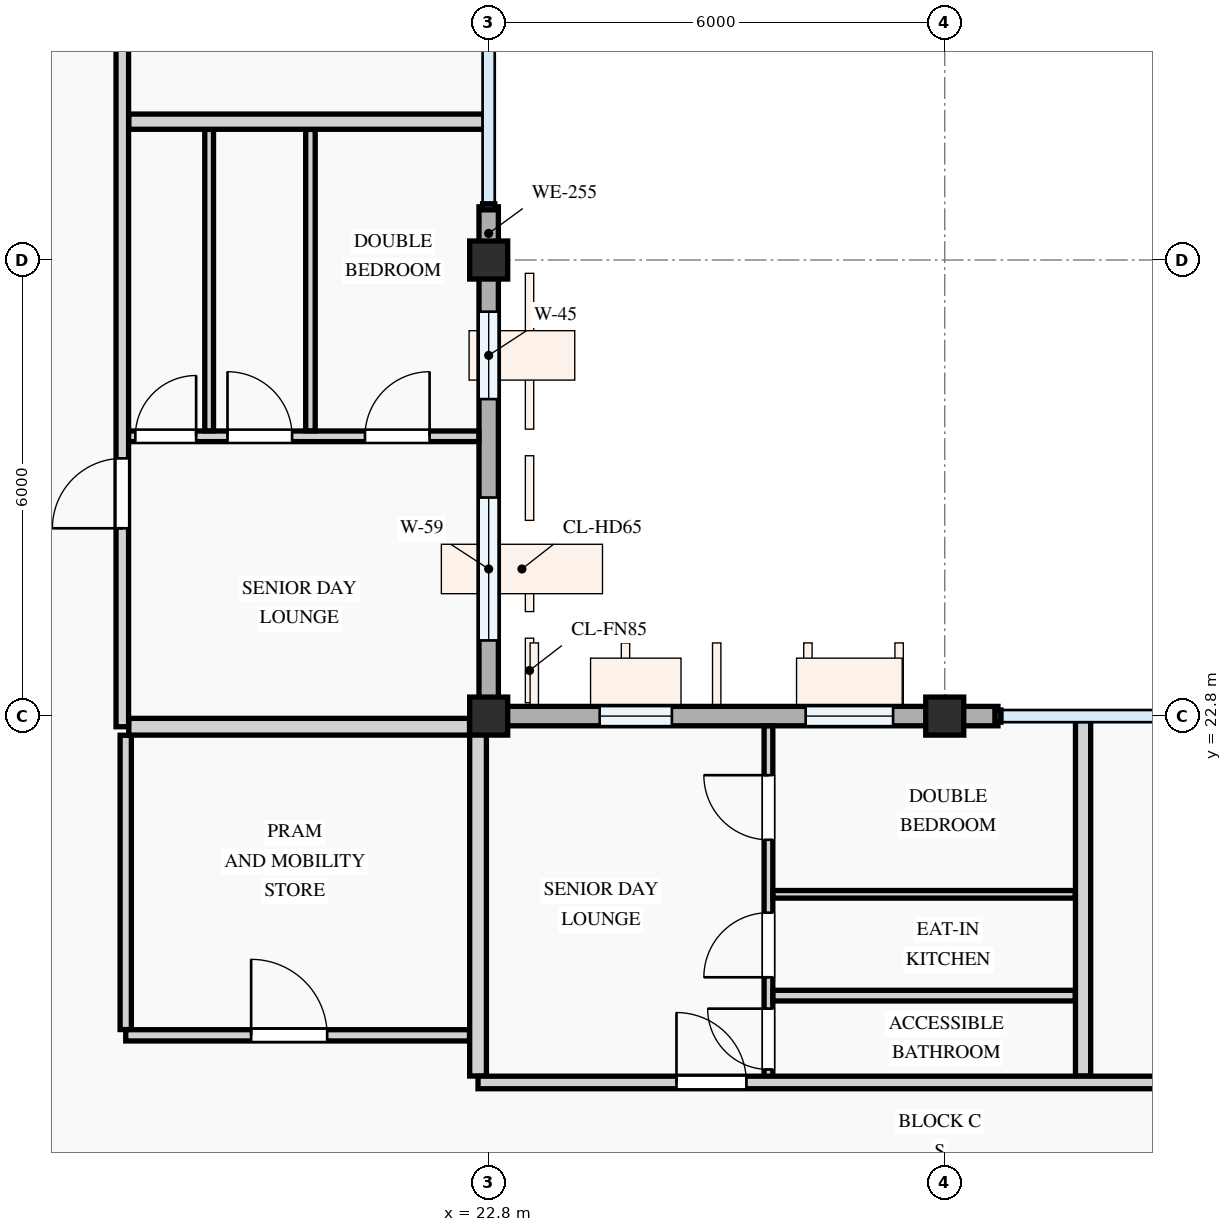
"""IFC4 building model, lengths in metres.
Left out: names, types, materials, properties, quantities, classifications, styles, units other than length and angle.
Written with IfcOpenShell. Run it as: python <this file> out.ifc"""

import sys

from ifc_helpers import new_model, si_unit, direction, frame, frame_2d, origin, origin_2d, place, context, subcontext, project, spatial, rectangle, extrude, element, fill, save


model = new_model("IFC4")
c1 = context("Model", 3, precision=1e-05, world=origin(), true_north=direction((0.0, 1.0)))
c2 = subcontext(c1, "Body", "Model", "MODEL_VIEW")
j1 = project(units=[si_unit("LENGTHUNIT", "METRE"), si_unit("PLANEANGLEUNIT", "RADIAN")], contexts=[c1])
p1 = place(None, origin())
s1 = spatial("IfcSite", under=j1, at=p1, CompositionType="ELEMENT")
p2 = place(p1, origin())
s2 = spatial("IfcBuilding", under=s1, at=p2, CompositionType="ELEMENT")
p3 = place(p2, frame((0.0, 0.0, 31.2)))
s3 = spatial("IfcBuildingStorey", under=s2, at=p3, CompositionType="ELEMENT", Elevation=31.2)
for number, where, z_axis, x_axis in (
    (1, (22.8, 22.8, 0.0), (0.0, 0.0, 1.0), (1.0, 0.0, 0.0)),
    (2, (22.8, 28.8, 0.0), (0.0, 0.0, 1.0), (1.0, 0.0, 0.0)),
    (3, (28.8, 22.8, 0.0), (0.0, 0.0, 1.0), (1.0, 0.0, 0.0)),
):
    element("IfcColumn", number, at=place(p3, frame(where, z_axis=z_axis, x_axis=x_axis)), inside=s3, PredefinedType="COLUMN", context=c2, shape_type="SweptSolid", body=[
        extrude(rectangle(XDim=0.5, YDim=0.5, at=origin_2d()), origin(), (0.0, 0.0, 1.0), 3.3),
    ])
p4 = place(p3, frame((22.8, 22.8, 0.0), z_axis=(0.0, 0.0, 1.0), x_axis=(0.0, 1.0, 0.0)))
e4 = element("IfcWall", 4, at=p4, inside=s3, PredefinedType="STANDARD", context=c2, shape_type="SweptSolid", body=[
    extrude(rectangle(XDim=6.0, YDim=0.255, at=frame_2d((3.0, 0.0))), origin(), (0.0, 0.0, 1.0), 2.575),
])
p5 = place(p4, frame((0.995, 0.0, 0.78)))
e5 = element("IfcOpeningElement", 5, at=p5, cuts=e4, PredefinedType="OPENING", context=c2, shape_type="SweptSolid", body=[
    extrude(rectangle(XDim=1.88, YDim=1.52, at=frame_2d((0.94, 0.76))), frame((0.0, 0.137, 0.0), z_axis=(0.0, -1.0, 0.0), x_axis=(1.0, 0.0, 0.0)), (0.0, 0.0, 1.0), 0.275),
])
p6 = place(p4, frame((4.17, 0.0, 0.78)))
e6 = element("IfcOpeningElement", 6, at=p6, cuts=e4, PredefinedType="OPENING", context=c2, shape_type="SweptSolid", body=[
    extrude(rectangle(XDim=1.15, YDim=1.25, at=frame_2d((0.575, 0.625))), frame((0.0, 0.137, 0.0), z_axis=(0.0, -1.0, 0.0), x_axis=(1.0, 0.0, 0.0)), (0.0, 0.0, 1.0), 0.275),
])
p7 = place(p3, frame((22.8, 28.8, 0.0), z_axis=(0.0, 0.0, 1.0), x_axis=(0.0, 1.0, 0.0)))
e7 = element("IfcWall", 7, at=p7, inside=s3, PredefinedType="STANDARD", context=c2, shape_type="SweptSolid", body=[
    extrude(rectangle(XDim=0.7, YDim=0.255, at=frame_2d((0.35, 0.0))), origin(), (0.0, 0.0, 1.0), 2.425),
])
p8 = place(p3, frame((29.5, 22.8, 0.0), z_axis=(0.0, 0.0, 1.0), x_axis=(-1.0, 0.0, 0.0)))
e8 = element("IfcWall", 8, at=p8, inside=s3, PredefinedType="STANDARD", context=c2, shape_type="SweptSolid", body=[
    extrude(rectangle(XDim=0.7, YDim=0.255, at=frame_2d((0.35, 0.0))), origin(), (0.0, 0.0, 1.0), 2.375),
])
p9 = place(p3, frame((28.8, 22.8, 0.0), z_axis=(0.0, 0.0, 1.0), x_axis=(-1.0, 0.0, 0.0)))
e9 = element("IfcWall", 9, at=p9, inside=s3, PredefinedType="STANDARD", context=c2, shape_type="SweptSolid", body=[
    extrude(rectangle(XDim=6.0, YDim=0.255, at=frame_2d((3.0, 0.0))), origin(), (0.0, 0.0, 1.0), 2.525),
])
p10 = place(p9, frame((0.68, 0.0, 0.78)))
e10 = element("IfcOpeningElement", 10, at=p10, cuts=e9, PredefinedType="OPENING", context=c2, shape_type="SweptSolid", body=[
    extrude(rectangle(XDim=1.15, YDim=1.25, at=frame_2d((0.575, 0.625))), frame((0.0, 0.137, 0.0), z_axis=(0.0, -1.0, 0.0), x_axis=(1.0, 0.0, 0.0)), (0.0, 0.0, 1.0), 0.275),
])
p11 = place(p9, frame((3.59, 0.0, 0.78)))
e11 = element("IfcOpeningElement", 11, at=p11, cuts=e9, PredefinedType="OPENING", context=c2, shape_type="SweptSolid", body=[
    extrude(rectangle(XDim=0.95, YDim=1.15, at=frame_2d((0.475, 0.575))), frame((0.0, 0.137, 0.0), z_axis=(0.0, -1.0, 0.0), x_axis=(1.0, 0.0, 0.0)), (0.0, 0.0, 1.0), 0.275),
])
p12 = place(p3, frame((18.025, 18.676, 0.0), z_axis=(0.0, 0.0, 1.0), x_axis=(0.0, 1.0, 0.0)))
e12 = element("IfcWall", 12, at=p12, inside=s3, PredefinedType="PARTITIONING", context=c2, shape_type="SweptSolid", body=[
    extrude(rectangle(XDim=3.872, YDim=0.148, at=frame_2d((1.936, 0.0))), origin(), (0.0, 0.0, 1.0), 3.0),
])
p13 = place(p3, frame((18.025, 18.6, 0.0), z_axis=(0.0, 0.0, 1.0), x_axis=(1.0, 0.0, 0.0)))
e13 = element("IfcWall", 13, at=p13, inside=s3, PredefinedType="PARTITIONING", context=c2, shape_type="SweptSolid", body=[
    extrude(rectangle(XDim=4.523, YDim=0.148, at=frame_2d((2.262, 0.0))), origin(), (0.0, 0.0, 1.0), 3.0),
])
p14 = place(p13, frame((1.65, 0.0, 0.0)))
e14 = element("IfcOpeningElement", 14, at=p14, cuts=e13, PredefinedType="OPENING", context=c2, shape_type="SweptSolid", body=[
    extrude(rectangle(XDim=1.0, YDim=2.15, at=frame_2d((0.5, 1.075))), frame((0.0, 0.084, 0.0), z_axis=(0.0, -1.0, 0.0), x_axis=(1.0, 0.0, 0.0)), (0.0, 0.0, 1.0), 0.168),
])
p15 = place(p3, frame((17.98, 26.481, 0.0), z_axis=(0.0, 0.0, 1.0), x_axis=(1.0, 0.0, 0.0)))
e15 = element("IfcWall", 15, at=p15, inside=s3, PredefinedType="PARTITIONING", context=c2, shape_type="SweptSolid", body=[
    extrude(rectangle(XDim=4.69, YDim=0.14, at=frame_2d((2.345, 0.0))), origin(), (0.0, 0.0, 1.0), 3.0),
])
p16 = place(p15, frame((0.171, 0.0, 0.0)))
e16 = element("IfcOpeningElement", 16, at=p16, cuts=e15, PredefinedType="OPENING", context=c2, shape_type="SweptSolid", body=[
    extrude(rectangle(XDim=0.8, YDim=2.1, at=frame_2d((0.4, 1.05))), frame((0.0, 0.08, 0.0), z_axis=(0.0, -1.0, 0.0), x_axis=(1.0, 0.0, 0.0)), (0.0, 0.0, 1.0), 0.16),
])
p17 = place(p15, frame((1.384, 0.0, 0.0)))
e17 = element("IfcOpeningElement", 17, at=p17, cuts=e15, PredefinedType="OPENING", context=c2, shape_type="SweptSolid", body=[
    extrude(rectangle(XDim=0.85, YDim=2.1, at=frame_2d((0.425, 1.05))), frame((0.0, 0.08, 0.0), z_axis=(0.0, -1.0, 0.0), x_axis=(1.0, 0.0, 0.0)), (0.0, 0.0, 1.0), 0.16),
])
p18 = place(p15, frame((3.193, 0.0, 0.0)))
e18 = element("IfcOpeningElement", 18, at=p18, cuts=e15, PredefinedType="OPENING", context=c2, shape_type="SweptSolid", body=[
    extrude(rectangle(XDim=0.85, YDim=2.1, at=frame_2d((0.425, 1.05))), frame((0.0, 0.08, 0.0), z_axis=(0.0, -1.0, 0.0), x_axis=(1.0, 0.0, 0.0)), (0.0, 0.0, 1.0), 0.16),
])
p19 = place(p3, frame((20.455, 26.553, 0.0), z_axis=(0.0, 0.0, 1.0), x_axis=(0.0, 1.0, 0.0)))
e19 = element("IfcWall", 19, at=p19, inside=s3, PredefinedType="PARTITIONING", context=c2, shape_type="SweptSolid", body=[
    extrude(rectangle(XDim=3.965, YDim=0.125, at=frame_2d((1.983, 0.0))), origin(), (0.0, 0.0, 1.0), 3.0),
])
p20 = place(p3, frame((19.122, 26.553, 0.0), z_axis=(0.0, 0.0, 1.0), x_axis=(0.0, 1.0, 0.0)))
e20 = element("IfcWall", 20, at=p20, inside=s3, PredefinedType="PARTITIONING", context=c2, shape_type="SweptSolid", body=[
    extrude(rectangle(XDim=3.965, YDim=0.115, at=frame_2d((1.983, 0.0))), origin(), (0.0, 0.0, 1.0), 3.0),
])
p21 = place(p3, frame((18.064, 22.66, 0.0), z_axis=(0.0, 0.0, 1.0), x_axis=(1.0, 0.0, 0.0)))
e21 = element("IfcWall", 21, at=p21, inside=s3, PredefinedType="PARTITIONING", context=c2, shape_type="SweptSolid", body=[
    extrude(rectangle(XDim=4.484, YDim=0.22, at=frame_2d((2.242, 0.0))), origin(), (0.0, 0.0, 1.0), 2.375),
])
p22 = place(p3, frame((18.064, 30.62, 0.0), z_axis=(0.0, 0.0, 1.0), x_axis=(1.0, 0.0, 0.0)))
e22 = element("IfcWall", 22, at=p22, inside=s3, PredefinedType="PARTITIONING", context=c2, shape_type="SweptSolid", body=[
    extrude(rectangle(XDim=4.676, YDim=0.2, at=frame_2d((2.338, 0.0))), origin(), (0.0, 0.0, 1.0), 3.0),
])
p23 = place(p3, frame((17.98, 22.66, 0.0), z_axis=(0.0, 0.0, 1.0), x_axis=(0.0, 1.0, 0.0)))
e23 = element("IfcWall", 23, at=p23, inside=s3, PredefinedType="PARTITIONING", context=c2, shape_type="SweptSolid", body=[
    extrude(rectangle(XDim=20.411, YDim=0.165, at=frame_2d((10.205, 0.0))), origin(), (0.0, 0.0, 1.0), 3.0),
])
p24 = place(p23, frame((2.611, 0.0, 0.0)))
e24 = element("IfcOpeningElement", 24, at=p24, cuts=e23, PredefinedType="OPENING", context=c2, shape_type="SweptSolid", body=[
    extrude(rectangle(XDim=0.92, YDim=2.1, at=frame_2d((0.46, 1.05))), frame((0.0, 0.093, 0.0), z_axis=(0.0, -1.0, 0.0), x_axis=(1.0, 0.0, 0.0)), (0.0, 0.0, 1.0), 0.185),
])
p25 = place(p23, frame((9.885, 0.0, 0.0)))
e25 = element("IfcOpeningElement", 25, at=p25, cuts=e23, PredefinedType="OPENING", context=c2, shape_type="SweptSolid", body=[
    extrude(rectangle(XDim=0.92, YDim=2.1, at=frame_2d((0.46, 1.05))), frame((0.0, 0.093, 0.0), z_axis=(0.0, -1.0, 0.0), x_axis=(1.0, 0.0, 0.0)), (0.0, 0.0, 1.0), 0.185),
])
p26 = place(p3, frame((26.481, 17.98, 0.0), z_axis=(0.0, 0.0, 1.0), x_axis=(0.0, 1.0, 0.0)))
e26 = element("IfcWall", 26, at=p26, inside=s3, PredefinedType="PARTITIONING", context=c2, shape_type="SweptSolid", body=[
    extrude(rectangle(XDim=4.69, YDim=0.115, at=frame_2d((2.345, 0.0))), origin(), (0.0, 0.0, 1.0), 3.0),
])
p27 = place(p26, frame((0.171, 0.0, 0.0)))
e27 = element("IfcOpeningElement", 27, at=p27, cuts=e26, PredefinedType="OPENING", context=c2, shape_type="SweptSolid", body=[
    extrude(rectangle(XDim=0.8, YDim=2.1, at=frame_2d((0.4, 1.05))), frame((0.0, 0.067, 0.0), z_axis=(0.0, -1.0, 0.0), x_axis=(1.0, 0.0, 0.0)), (0.0, 0.0, 1.0), 0.135),
])
p28 = place(p26, frame((1.384, 0.0, 0.0)))
e28 = element("IfcOpeningElement", 28, at=p28, cuts=e26, PredefinedType="OPENING", context=c2, shape_type="SweptSolid", body=[
    extrude(rectangle(XDim=0.85, YDim=2.1, at=frame_2d((0.425, 1.05))), frame((0.0, 0.067, 0.0), z_axis=(0.0, -1.0, 0.0), x_axis=(1.0, 0.0, 0.0)), (0.0, 0.0, 1.0), 0.135),
])
p29 = place(p26, frame((3.193, 0.0, 0.0)))
e29 = element("IfcOpeningElement", 29, at=p29, cuts=e26, PredefinedType="OPENING", context=c2, shape_type="SweptSolid", body=[
    extrude(rectangle(XDim=0.85, YDim=2.1, at=frame_2d((0.425, 1.05))), frame((0.0, 0.067, 0.0), z_axis=(0.0, -1.0, 0.0), x_axis=(1.0, 0.0, 0.0)), (0.0, 0.0, 1.0), 0.135),
])
p30 = place(p3, frame((26.54, 20.455, 0.0), z_axis=(0.0, 0.0, 1.0), x_axis=(1.0, 0.0, 0.0)))
e30 = element("IfcWall", 30, at=p30, inside=s3, PredefinedType="PARTITIONING", context=c2, shape_type="SweptSolid", body=[
    extrude(rectangle(XDim=3.978, YDim=0.1, at=frame_2d((1.989, 0.0))), origin(), (0.0, 0.0, 1.0), 3.0),
])
p31 = place(p3, frame((26.54, 19.122, 0.0), z_axis=(0.0, 0.0, 1.0), x_axis=(1.0, 0.0, 0.0)))
e31 = element("IfcWall", 31, at=p31, inside=s3, PredefinedType="PARTITIONING", context=c2, shape_type="SweptSolid", body=[
    extrude(rectangle(XDim=3.978, YDim=0.14, at=frame_2d((1.989, 0.0))), origin(), (0.0, 0.0, 1.0), 3.0),
])
p32 = place(p3, frame((22.66, 18.064, 0.0), z_axis=(0.0, 0.0, 1.0), x_axis=(0.0, 1.0, 0.0)))
e32 = element("IfcWall", 32, at=p32, inside=s3, PredefinedType="PARTITIONING", context=c2, shape_type="SweptSolid", body=[
    extrude(rectangle(XDim=4.676, YDim=0.22, at=frame_2d((2.338, 0.0))), origin(), (0.0, 0.0, 1.0), 2.425),
])
p33 = place(p3, frame((30.62, 18.064, 0.0), z_axis=(0.0, 0.0, 1.0), x_axis=(0.0, 1.0, 0.0)))
e33 = element("IfcWall", 33, at=p33, inside=s3, PredefinedType="PARTITIONING", context=c2, shape_type="SweptSolid", body=[
    extrude(rectangle(XDim=4.676, YDim=0.2, at=frame_2d((2.338, 0.0))), origin(), (0.0, 0.0, 1.0), 3.0),
])
p34 = place(p3, frame((22.66, 17.98, 0.0), z_axis=(0.0, 0.0, 1.0), x_axis=(1.0, 0.0, 0.0)))
e34 = element("IfcWall", 34, at=p34, inside=s3, PredefinedType="PARTITIONING", context=c2, shape_type="SweptSolid", body=[
    extrude(rectangle(XDim=20.48, YDim=0.165, at=frame_2d((10.24, 0.0))), origin(), (0.0, 0.0, 1.0), 3.0),
])
p35 = place(p34, frame((2.611, 0.0, 0.0)))
e35 = element("IfcOpeningElement", 35, at=p35, cuts=e34, PredefinedType="OPENING", context=c2, shape_type="SweptSolid", body=[
    extrude(rectangle(XDim=0.92, YDim=2.1, at=frame_2d((0.46, 1.05))), frame((0.0, 0.093, 0.0), z_axis=(0.0, -1.0, 0.0), x_axis=(1.0, 0.0, 0.0)), (0.0, 0.0, 1.0), 0.185),
])
p36 = place(p34, frame((9.885, 0.0, 0.0)))
e36 = element("IfcOpeningElement", 36, at=p36, cuts=e34, PredefinedType="OPENING", context=c2, shape_type="SweptSolid", body=[
    extrude(rectangle(XDim=0.92, YDim=2.1, at=frame_2d((0.46, 1.05))), frame((0.0, 0.093, 0.0), z_axis=(0.0, -1.0, 0.0), x_axis=(1.0, 0.0, 0.0)), (0.0, 0.0, 1.0), 0.185),
])
p37 = place(p5, origin())
e37 = element("IfcWindow", 37, at=p37, inside=s3, PartitioningType="DOUBLE_PANEL_VERTICAL", PredefinedType="WINDOW", context=c2, shape_type="SweptSolid", body=[
    extrude(rectangle(XDim=1.88, YDim=1.52, at=frame_2d((0.94, 0.76))), frame((0.0, 0.03, 0.0), z_axis=(0.0, -1.0, 0.0), x_axis=(1.0, 0.0, 0.0)), (0.0, 0.0, 1.0), 0.06),
])
fill(e5, e37)
p38 = place(p6, origin())
e38 = element("IfcWindow", 38, at=p38, inside=s3, PartitioningType="SINGLE_PANEL", PredefinedType="WINDOW", context=c2, shape_type="SweptSolid", body=[
    extrude(rectangle(XDim=1.15, YDim=1.25, at=frame_2d((0.575, 0.625))), frame((0.0, 0.03, 0.0), z_axis=(0.0, -1.0, 0.0), x_axis=(1.0, 0.0, 0.0)), (0.0, 0.0, 1.0), 0.06),
])
fill(e6, e38)
p39 = place(p10, origin())
e39 = element("IfcWindow", 39, at=p39, inside=s3, PartitioningType="SINGLE_PANEL", PredefinedType="WINDOW", context=c2, shape_type="SweptSolid", body=[
    extrude(rectangle(XDim=1.15, YDim=1.25, at=frame_2d((0.575, 0.625))), frame((0.0, 0.03, 0.0), z_axis=(0.0, -1.0, 0.0), x_axis=(1.0, 0.0, 0.0)), (0.0, 0.0, 1.0), 0.06),
])
fill(e10, e39)
p40 = place(p11, origin())
e40 = element("IfcWindow", 40, at=p40, inside=s3, PartitioningType="SINGLE_PANEL", PredefinedType="WINDOW", context=c2, shape_type="SweptSolid", body=[
    extrude(rectangle(XDim=0.95, YDim=1.15, at=frame_2d((0.475, 0.575))), frame((0.0, 0.03, 0.0), z_axis=(0.0, -1.0, 0.0), x_axis=(1.0, 0.0, 0.0)), (0.0, 0.0, 1.0), 0.06),
])
fill(e11, e40)
p41 = place(p14, origin())
e41 = element("IfcDoor", 41, at=p41, inside=s3, OperationType="SINGLE_SWING_LEFT", PredefinedType="DOOR", context=c2, shape_type="SweptSolid", body=[
    extrude(rectangle(XDim=1.0, YDim=2.15, at=frame_2d((0.5, 1.075))), frame((0.0, 0.025, 0.0), z_axis=(0.0, -1.0, 0.0), x_axis=(1.0, 0.0, 0.0)), (0.0, 0.0, 1.0), 0.05),
])
fill(e14, e41)
p42 = place(p16, origin())
e42 = element("IfcDoor", 42, at=p42, inside=s3, OperationType="SINGLE_SWING_RIGHT", PredefinedType="DOOR", context=c2, shape_type="SweptSolid", body=[
    extrude(rectangle(XDim=0.8, YDim=2.1, at=frame_2d((0.4, 1.05))), frame((0.0, 0.025, 0.0), z_axis=(0.0, -1.0, 0.0), x_axis=(1.0, 0.0, 0.0)), (0.0, 0.0, 1.0), 0.05),
])
fill(e16, e42)
p43 = place(p17, origin())
e43 = element("IfcDoor", 43, at=p43, inside=s3, OperationType="SINGLE_SWING_LEFT", PredefinedType="DOOR", context=c2, shape_type="SweptSolid", body=[
    extrude(rectangle(XDim=0.85, YDim=2.1, at=frame_2d((0.425, 1.05))), frame((0.0, 0.025, 0.0), z_axis=(0.0, -1.0, 0.0), x_axis=(1.0, 0.0, 0.0)), (0.0, 0.0, 1.0), 0.05),
])
fill(e17, e43)
p44 = place(p18, origin())
e44 = element("IfcDoor", 44, at=p44, inside=s3, OperationType="SINGLE_SWING_RIGHT", PredefinedType="DOOR", context=c2, shape_type="SweptSolid", body=[
    extrude(rectangle(XDim=0.85, YDim=2.1, at=frame_2d((0.425, 1.05))), frame((0.0, 0.025, 0.0), z_axis=(0.0, -1.0, 0.0), x_axis=(1.0, 0.0, 0.0)), (0.0, 0.0, 1.0), 0.05),
])
fill(e18, e44)
p45 = place(p24, origin())
e45 = element("IfcDoor", 45, at=p45, inside=s3, OperationType="SINGLE_SWING_LEFT", PredefinedType="DOOR", context=c2, shape_type="SweptSolid", body=[
    extrude(rectangle(XDim=0.92, YDim=2.1, at=frame_2d((0.46, 1.05))), frame((0.0, 0.025, 0.0), z_axis=(0.0, -1.0, 0.0), x_axis=(1.0, 0.0, 0.0)), (0.0, 0.0, 1.0), 0.05),
])
fill(e24, e45)
p46 = place(p27, origin())
e46 = element("IfcDoor", 46, at=p46, inside=s3, OperationType="SINGLE_SWING_RIGHT", PredefinedType="DOOR", context=c2, shape_type="SweptSolid", body=[
    extrude(rectangle(XDim=0.8, YDim=2.1, at=frame_2d((0.4, 1.05))), frame((0.0, 0.025, 0.0), z_axis=(0.0, -1.0, 0.0), x_axis=(1.0, 0.0, 0.0)), (0.0, 0.0, 1.0), 0.05),
])
fill(e27, e46)
p47 = place(p28, origin())
e47 = element("IfcDoor", 47, at=p47, inside=s3, OperationType="SINGLE_SWING_LEFT", PredefinedType="DOOR", context=c2, shape_type="SweptSolid", body=[
    extrude(rectangle(XDim=0.85, YDim=2.1, at=frame_2d((0.425, 1.05))), frame((0.0, 0.025, 0.0), z_axis=(0.0, -1.0, 0.0), x_axis=(1.0, 0.0, 0.0)), (0.0, 0.0, 1.0), 0.05),
])
fill(e28, e47)
p48 = place(p29, origin())
e48 = element("IfcDoor", 48, at=p48, inside=s3, OperationType="SINGLE_SWING_RIGHT", PredefinedType="DOOR", context=c2, shape_type="SweptSolid", body=[
    extrude(rectangle(XDim=0.85, YDim=2.1, at=frame_2d((0.425, 1.05))), frame((0.0, 0.025, 0.0), z_axis=(0.0, -1.0, 0.0), x_axis=(1.0, 0.0, 0.0)), (0.0, 0.0, 1.0), 0.05),
])
fill(e29, e48)
p49 = place(p35, origin())
e49 = element("IfcDoor", 49, at=p49, inside=s3, OperationType="SINGLE_SWING_LEFT", PredefinedType="DOOR", context=c2, shape_type="SweptSolid", body=[
    extrude(rectangle(XDim=0.92, YDim=2.1, at=frame_2d((0.46, 1.05))), frame((0.0, 0.025, 0.0), z_axis=(0.0, -1.0, 0.0), x_axis=(1.0, 0.0, 0.0)), (0.0, 0.0, 1.0), 0.05),
])
fill(e35, e49)
save(model, sys.argv[1])
